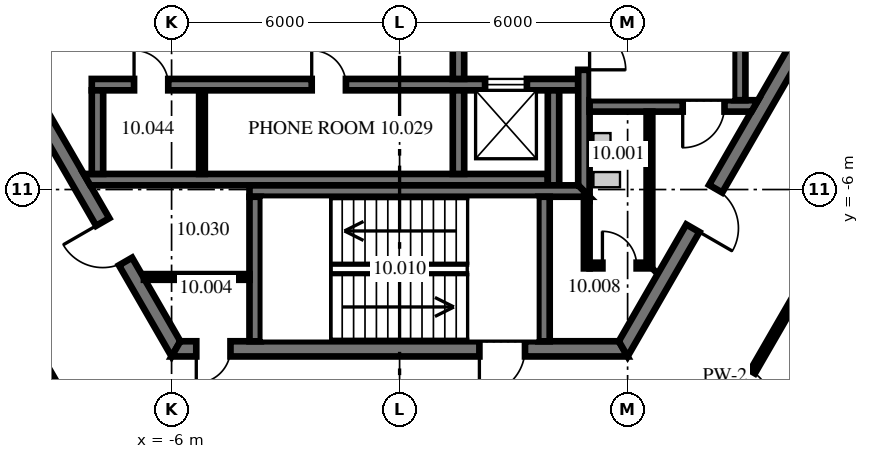
"""IFC4 building model, lengths in metres.
Left out: names, types, materials, properties, quantities, classifications, styles, units other than length and angle.
Written with IfcOpenShell. Run it as: python <this file> out.ifc"""

import sys

from ifc_helpers import new_model, si_unit, direction, frame, frame_2d, origin, place, context, subcontext, project, spatial, polyline, rectangle, outline, extrude, source, transform, mapped, element, fill, save


model = new_model("IFC4")
c1 = context("Model", 3, precision=1e-05, world=origin(), true_north=direction((0.0, 1.0)))
c2 = subcontext(c1, "Body", "Model", "MODEL_VIEW")
j1 = project(units=[si_unit("LENGTHUNIT", "METRE"), si_unit("PLANEANGLEUNIT", "RADIAN")], contexts=[c1])
p1 = place(None, origin())
s1 = spatial("IfcSite", under=j1, at=p1, CompositionType="ELEMENT")
p2 = place(p1, origin())
s2 = spatial("IfcBuilding", under=s1, at=p2, CompositionType="ELEMENT")
p3 = place(p2, frame((0.0, 0.0, 46.1)))
s3 = spatial("IfcBuildingStorey", under=s2, at=p3, CompositionType="ELEMENT", Elevation=46.1)
m1 = source(origin(), c2, "Body", "SweptSolid", [
    extrude(outline(polyline([(-0.115, -0.2), (11.885, -0.2), (11.654, 0.2), (0.115, 0.2), (-0.115, -0.2)])), origin(), (0.0, 0.0, 1.0), 4.1),
])
p4 = place(p3, frame((-11.769, 0.0, 0.0), z_axis=(0.0, 0.0, 1.0), x_axis=(0.499996592174, -0.866027371285, 0.0)))
e1 = element("IfcWall", 1, at=p4, inside=s3, PredefinedType="SHEAR", context=c2, shape_type="MappedRepresentation", body=[
    mapped(m1, transform((0.0, 0.0, 0.0), scale=1.0)),
])
p5 = place(p4, frame((1.405, 0.0, 0.0)))
e2 = element("IfcOpeningElement", 2, at=p5, cuts=e1, PredefinedType="OPENING", context=c2, shape_type="SweptSolid", body=[
    extrude(rectangle(XDim=1.8, YDim=2.1, at=frame_2d((0.9, 1.05))), frame((0.0, 0.21, 0.0), z_axis=(0.0, -1.0, 0.0), x_axis=(1.0, 0.0, 0.0)), (0.0, 0.0, 1.0), 0.42),
])
p6 = place(p4, frame((7.915, 0.0, 0.0)))
e3 = element("IfcOpeningElement", 3, at=p6, cuts=e1, PredefinedType="OPENING", context=c2, shape_type="SweptSolid", body=[
    extrude(rectangle(XDim=1.2, YDim=2.1, at=frame_2d((0.6, 1.05))), frame((0.0, 0.21, 0.0), z_axis=(0.0, -1.0, 0.0), x_axis=(1.0, 0.0, 0.0)), (0.0, 0.0, 1.0), 0.42),
])
p7 = place(p3, frame((-5.885, -10.192, 0.0), z_axis=(0.0, 0.0, 1.0), x_axis=(1.0, 0.0, 0.0)))
e4 = element("IfcWall", 4, at=p7, inside=s3, PredefinedType="SHEAR", context=c2, shape_type="MappedRepresentation", body=[
    mapped(m1, transform((0.0, 0.0, 0.0), scale=1.0)),
])
p8 = place(p7, frame((7.985, 0.0, 0.0)))
e5 = element("IfcOpeningElement", 5, at=p8, cuts=e4, PredefinedType="OPENING", context=c2, shape_type="SweptSolid", body=[
    extrude(rectangle(XDim=1.2, YDim=2.1, at=frame_2d((0.6, 1.05))), frame((0.0, 0.21, 0.0), z_axis=(0.0, -1.0, 0.0), x_axis=(1.0, 0.0, 0.0)), (0.0, 0.0, 1.0), 0.42),
])
p9 = place(p7, frame((0.534, 0.0, 0.0)))
e6 = element("IfcOpeningElement", 6, at=p9, cuts=e4, PredefinedType="OPENING", context=c2, shape_type="SweptSolid", body=[
    extrude(rectangle(XDim=0.9, YDim=2.1, at=frame_2d((0.45, 1.05))), frame((0.0, 0.21, 0.0), z_axis=(0.0, -1.0, 0.0), x_axis=(1.0, 0.0, 0.0)), (0.0, 0.0, 1.0), 0.42),
])
p10 = place(p3, frame((5.885, -10.192, 0.0), z_axis=(0.0, 0.0, 1.0), x_axis=(0.499996592174, 0.866027371285, 0.0)))
e7 = element("IfcWall", 7, at=p10, inside=s3, PredefinedType="SHEAR", context=c2, shape_type="MappedRepresentation", body=[
    mapped(m1, transform((0.0, 0.0, 0.0), scale=1.0)),
])
p11 = place(p10, frame((3.665, 0.0, 0.0)))
e8 = element("IfcOpeningElement", 8, at=p11, cuts=e7, PredefinedType="OPENING", context=c2, shape_type="SweptSolid", body=[
    extrude(rectangle(XDim=1.2, YDim=2.1, at=frame_2d((0.6, 1.05))), frame((0.0, 0.21, 0.0), z_axis=(0.0, -1.0, 0.0), x_axis=(1.0, 0.0, 0.0)), (0.0, 0.0, 1.0), 0.42),
])
m2 = source(origin(), c2, "Body", "SweptSolid", [
    extrude(rectangle(XDim=12.8, YDim=0.3, at=frame_2d((6.4, 0.0))), origin(), (0.0, 0.0, 1.0), 4.1),
])
p12 = place(p3, frame((-8.1, -3.24, 0.0), z_axis=(0.0, 0.0, 1.0), x_axis=(1.0, 0.0, 0.0)))
e9 = element("IfcWall", 9, at=p12, inside=s3, PredefinedType="SHEAR", context=c2, shape_type="MappedRepresentation", body=[
    mapped(m2, transform((0.0, 0.0, 0.0), scale=1.0)),
])
p13 = place(p12, frame((1.113, 0.0, 0.0)))
e10 = element("IfcOpeningElement", 10, at=p13, cuts=e9, PredefinedType="OPENING", context=c2, shape_type="SweptSolid", body=[
    extrude(rectangle(XDim=0.9, YDim=2.1, at=frame_2d((0.45, 1.05))), frame((0.0, 0.16, 0.0), z_axis=(0.0, -1.0, 0.0), x_axis=(1.0, 0.0, 0.0)), (0.0, 0.0, 1.0), 0.32),
])
p14 = place(p12, frame((5.788, 0.0, 0.0)))
e11 = element("IfcOpeningElement", 11, at=p14, cuts=e9, PredefinedType="OPENING", context=c2, shape_type="SweptSolid", body=[
    extrude(rectangle(XDim=0.9, YDim=2.1, at=frame_2d((0.45, 1.05))), frame((0.0, 0.16, 0.0), z_axis=(0.0, -1.0, 0.0), x_axis=(1.0, 0.0, 0.0)), (0.0, 0.0, 1.0), 0.32),
])
p15 = place(p12, frame((10.35, 0.0, 0.0)))
e12 = element("IfcOpeningElement", 12, at=p15, cuts=e9, PredefinedType="OPENING", context=c2, shape_type="SweptSolid", body=[
    extrude(rectangle(XDim=1.1, YDim=2.1, at=frame_2d((0.55, 1.05))), frame((0.0, 0.16, 0.0), z_axis=(0.0, -1.0, 0.0), x_axis=(1.0, 0.0, 0.0)), (0.0, 0.0, 1.0), 0.32),
])
m3 = source(origin(), c2, "Body", "SweptSolid", [
    extrude(outline(polyline([(12.0, -0.15), (-0.04, -0.15), (-0.213, 0.15), (12.0, 0.15), (12.0, -0.15)])), origin(), (0.0, 0.0, 1.0), 4.1),
])
p16 = place(p3, frame((-8.1, -5.74, 0.0), z_axis=(0.0, 0.0, 1.0), x_axis=(1.0, 0.0, 0.0)))
e13 = element("IfcWall", 13, at=p16, inside=s3, PredefinedType="SHEAR", context=c2, shape_type="MappedRepresentation", body=[
    mapped(m3, transform((0.0, 0.0, 0.0), scale=1.0)),
])
m4 = source(origin(), c2, "Body", "SweptSolid", [
    extrude(rectangle(XDim=2.2, YDim=0.3, at=frame_2d((1.1, 0.0))), origin(), (0.0, 0.0, 1.0), 4.1),
])
for number, where, z_axis, x_axis in (
    (14, (-7.95, -5.59, 0.0), (0.0, 0.0, 1.0), (0.0, 1.0, 0.0)),
    (15, (1.55, -5.59, 0.0), (0.0, 0.0, 1.0), (0.0, 1.0, 0.0)),
):
    element("IfcWall", number, at=place(p3, frame(where, z_axis=z_axis, x_axis=x_axis)), inside=s3, PredefinedType="SHEAR", context=c2, shape_type="MappedRepresentation", body=[
        mapped(m4, transform((0.0, 0.0, 0.0), scale=1.0)),
    ])
m5 = source(origin(), c2, "Body", "SweptSolid", [
    extrude(rectangle(XDim=2.5, YDim=0.3, at=frame_2d((1.25, 0.0))), origin(), (0.0, 0.0, 1.0), 4.1),
])
p17 = place(p3, frame((4.05, -5.89, 0.0), z_axis=(0.0, 0.0, 1.0), x_axis=(0.0, 1.0, 0.0)))
e16 = element("IfcWall", 16, at=p17, inside=s3, PredefinedType="SHEAR", context=c2, shape_type="MappedRepresentation", body=[
    mapped(m5, transform((0.0, 0.0, 0.0), scale=1.0)),
])
m6 = source(origin(), c2, "Body", "SweptSolid", [
    extrude(rectangle(XDim=3.0, YDim=0.3, at=frame_2d((1.5, 0.0))), origin(), (0.0, 0.0, 1.0), 4.1),
])
p18 = place(p3, frame((1.55, -3.09, 0.0), z_axis=(0.0, 0.0, 1.0), x_axis=(0.0, 1.0, 0.0)))
e17 = element("IfcWall", 17, at=p18, inside=s3, PredefinedType="SHEAR", context=c2, shape_type="MappedRepresentation", body=[
    mapped(m6, transform((0.0, 0.0, 0.0), scale=1.0)),
])
p19 = place(p18, frame((0.9, 0.0, 0.0)))
e18 = element("IfcOpeningElement", 18, at=p19, cuts=e17, PredefinedType="OPENING", context=c2, shape_type="SweptSolid", body=[
    extrude(rectangle(XDim=1.2, YDim=2.1, at=frame_2d((0.6, 1.05))), frame((0.0, 0.16, 0.0), z_axis=(0.0, -1.0, 0.0), x_axis=(1.0, 0.0, 0.0)), (0.0, 0.0, 1.0), 0.32),
])
m7 = source(origin(), c2, "Body", "SweptSolid", [
    extrude(outline(polyline([(-0.15, -0.15), (9.99, -0.15), (9.99, 0.15), (0.15, 0.15), (-0.15, -0.15)])), origin(), (0.0, 0.0, 1.0), 4.1),
])
p20 = place(p3, frame((4.85, -6.04, 0.0), z_axis=(0.0, 0.0, 1.0), x_axis=(0.0, 1.0, 0.0)))
e19 = element("IfcWall", 19, at=p20, inside=s3, PredefinedType="SHEAR", context=c2, shape_type="MappedRepresentation", body=[
    mapped(m7, transform((0.0, 0.0, 0.0), scale=1.0)),
])
p21 = place(p20, frame((3.19, 0.0, 0.0)))
e20 = element("IfcOpeningElement", 20, at=p21, cuts=e19, PredefinedType="OPENING", context=c2, shape_type="SweptSolid", body=[
    extrude(rectangle(XDim=1.1, YDim=2.1, at=frame_2d((0.55, 1.05))), frame((0.0, 0.16, 0.0), z_axis=(0.0, -1.0, 0.0), x_axis=(1.0, 0.0, 0.0)), (0.0, 0.0, 1.0), 0.32),
])
m8 = source(origin(), c2, "Body", "SweptSolid", [
    extrude(outline(polyline([(0.0, -0.15), (0.0, 0.15), (4.433, 0.15), (4.26, -0.15), (0.0, -0.15)])), origin(), (0.0, 0.0, 1.0), 4.1),
])
p22 = place(p3, frame((5.0, -3.8, 0.0), z_axis=(0.0, 0.0, 1.0), x_axis=(1.0, 0.0, 0.0)))
e21 = element("IfcWall", 21, at=p22, inside=s3, PredefinedType="SHEAR", context=c2, shape_type="MappedRepresentation", body=[
    mapped(m8, transform((0.0, 0.0, 0.0), scale=1.0)),
])
p23 = place(p22, frame((2.45, 0.0, 0.0)))
e22 = element("IfcOpeningElement", 22, at=p23, cuts=e21, PredefinedType="OPENING", context=c2, shape_type="SweptSolid", body=[
    extrude(rectangle(XDim=1.1, YDim=2.1, at=frame_2d((0.55, 1.05))), frame((0.0, 0.16, 0.0), z_axis=(0.0, -1.0, 0.0), x_axis=(1.0, 0.0, 0.0)), (0.0, 0.0, 1.0), 0.32),
])
m9 = source(origin(), c2, "Body", "SweptSolid", [
    extrude(rectangle(XDim=7.3, YDim=0.3, at=frame_2d((3.65, 0.0))), origin(), (0.0, 0.0, 1.0), 4.1),
])
p24 = place(p3, frame((8.95, -3.65, 0.0), z_axis=(0.0, 0.0, 1.0), x_axis=(0.0, 1.0, 0.0)))
e23 = element("IfcWall", 23, at=p24, inside=s3, PredefinedType="SHEAR", context=c2, shape_type="MappedRepresentation", body=[
    mapped(m9, transform((0.0, 0.0, 0.0), scale=1.0)),
])
m10 = source(origin(), c2, "Body", "SweptSolid", [
    extrude(outline(polyline([(0.0, -0.15), (8.95, -0.15), (8.65, 0.15), (0.0, 0.15), (0.0, -0.15)])), origin(), (0.0, 0.0, 1.0), 4.1),
])
p25 = place(p3, frame((-3.95, -6.04, 0.0), z_axis=(0.0, 0.0, 1.0), x_axis=(1.0, 0.0, 0.0)))
e24 = element("IfcWall", 24, at=p25, inside=s3, PredefinedType="SHEAR", context=c2, shape_type="MappedRepresentation", body=[
    mapped(m10, transform((0.0, 0.0, 0.0), scale=1.0)),
])
m11 = source(origin(), c2, "Body", "SweptSolid", [
    extrude(outline(polyline([(3.8, -0.15), (-0.004, -0.15), (-0.004, 0.15), (3.8, 0.15), (3.8, -0.15)])), origin(), (0.0, 0.0, 1.0), 4.1),
])
for number, where, z_axis, x_axis in (
    (25, (-3.8, -9.99, 0.0), (0.0, 0.0, 1.0), (0.0, 1.0, 0.0)),
    (26, (3.8, -9.99, 0.0), (0.0, 0.0, 1.0), (0.0, 1.0, 0.0)),
):
    element("IfcWall", number, at=place(p3, frame(where, z_axis=z_axis, x_axis=x_axis)), inside=s3, PredefinedType="SHEAR", context=c2, shape_type="MappedRepresentation", body=[
        mapped(m11, transform((0.0, 0.0, 0.0), scale=1.0)),
    ])
m12 = source(origin(), c2, "Body", "SweptSolid", [
    extrude(rectangle(XDim=2.2, YDim=0.15, at=frame_2d((1.1, 0.0))), origin(), (0.0, 0.0, 1.0), 4.1),
])
p26 = place(p3, frame((-5.2, -5.59, 0.0), z_axis=(0.0, 0.0, 1.0), x_axis=(0.0, 1.0, 0.0)))
e27 = element("IfcWall", 27, at=p26, inside=s3, PredefinedType="PARTITIONING", context=c2, shape_type="MappedRepresentation", body=[
    mapped(m12, transform((0.0, 0.0, 0.0), scale=1.0)),
])
m13 = source(origin(), c2, "Body", "SweptSolid", [
    extrude(rectangle(XDim=2.777, YDim=0.15, at=frame_2d((1.389, 0.0))), origin(), (0.0, 0.0, 1.0), 4.1),
])
p27 = place(p3, frame((-6.727, -8.3, 0.0), z_axis=(0.0, 0.0, 1.0), x_axis=(1.0, 0.0, 0.0)))
e28 = element("IfcWall", 28, at=p27, inside=s3, PredefinedType="PARTITIONING", context=c2, shape_type="MappedRepresentation", body=[
    mapped(m13, transform((0.0, 0.0, 0.0), scale=1.0)),
])
m14 = source(origin(), c2, "Body", "SweptSolid", [
    extrude(outline(polyline([(0.0, -0.075), (1.65, -0.075), (1.5, 0.075), (0.0, 0.075), (0.0, -0.075)])), origin(), (0.0, 0.0, 1.0), 4.1),
])
p28 = place(p3, frame((5.0, -8.0, 0.0), z_axis=(0.0, 0.0, 1.0), x_axis=(1.0, 0.0, 0.0)))
e29 = element("IfcWall", 29, at=p28, inside=s3, PredefinedType="PARTITIONING", context=c2, shape_type="MappedRepresentation", body=[
    mapped(m14, transform((0.0, 0.0, 0.0), scale=1.0)),
])
p29 = place(p28, frame((0.337, 0.0, 0.0)))
e30 = element("IfcOpeningElement", 30, at=p29, cuts=e29, PredefinedType="OPENING", context=c2, shape_type="SweptSolid", body=[
    extrude(rectangle(XDim=0.9, YDim=2.1, at=frame_2d((0.45, 1.05))), frame((0.0, 0.085, 0.0), z_axis=(0.0, -1.0, 0.0), x_axis=(1.0, 0.0, 0.0)), (0.0, 0.0, 1.0), 0.17),
])
m15 = source(origin(), c2, "Body", "SweptSolid", [
    extrude(outline(polyline([(-0.075, -0.075), (4.05, -0.075), (4.05, 0.075), (0.075, 0.075), (-0.075, -0.075)])), origin(), (0.0, 0.0, 1.0), 4.1),
])
p30 = place(p3, frame((6.575, -8.0, 0.0), z_axis=(0.0, 0.0, 1.0), x_axis=(0.0, 1.0, 0.0)))
e31 = element("IfcWall", 31, at=p30, inside=s3, PredefinedType="PARTITIONING", context=c2, shape_type="MappedRepresentation", body=[
    mapped(m15, transform((0.0, 0.0, 0.0), scale=1.0)),
])
m16 = source(origin(), c2, "Body", "SweptSolid", [
    extrude(rectangle(XDim=1.885, YDim=0.15, at=frame_2d((0.942, 0.0))), origin(), (0.0, 0.0, 1.0), 4.1),
])
p31 = place(p3, frame((4.925, -8.075, 0.0), z_axis=(0.0, 0.0, 1.0), x_axis=(0.0, 1.0, 0.0)))
e32 = element("IfcWall", 32, at=p31, inside=s3, PredefinedType="PARTITIONING", context=c2, shape_type="MappedRepresentation", body=[
    mapped(m16, transform((0.0, 0.0, 0.0), scale=1.0)),
])
p32 = place(p3, frame((-12.827, -4.668, 0.0), z_axis=(0.0, 0.0, 1.0), x_axis=(0.500014404596, -0.866017087127, 0.0)))
e33 = element("IfcWall", 33, at=p32, inside=s3, PredefinedType="PARTITIONING", context=c2, shape_type="SweptSolid", body=[
    extrude(rectangle(XDim=10.062, YDim=0.2, at=frame_2d((5.031, 0.0))), origin(), (0.0, 0.0, 1.0), 4.1),
])
p33 = place(p32, frame((4.493, 0.0, 0.0)))
e34 = element("IfcOpeningElement", 34, at=p33, cuts=e33, PredefinedType="OPENING", context=c2, shape_type="SweptSolid", body=[
    extrude(rectangle(XDim=0.9, YDim=2.1, at=frame_2d((0.45, 1.05))), frame((0.0, 0.11, 0.0), z_axis=(0.0, -1.0, 0.0), x_axis=(1.0, 0.0, 0.0)), (0.0, 0.0, 1.0), 0.22),
])
p34 = place(p3, frame((7.776, -13.416, 0.0), z_axis=(0.0, 0.0, 1.0), x_axis=(0.50002671436, 0.866009979692, 0.0)))
e35 = element("IfcWall", 35, at=p34, inside=s3, PredefinedType="PARTITIONING", context=c2, shape_type="SweptSolid", body=[
    extrude(rectangle(XDim=5.14, YDim=0.15, at=frame_2d((2.57, 0.0))), origin(), (0.0, 0.0, 1.0), 4.1),
])
p35 = place(p34, frame((2.12, 0.0, 0.0)))
e36 = element("IfcOpeningElement", 36, at=p35, cuts=e35, PredefinedType="OPENING", context=c2, shape_type="SweptSolid", body=[
    extrude(rectangle(XDim=0.9, YDim=2.1, at=frame_2d((0.45, 1.05))), frame((0.0, 0.085, 0.0), z_axis=(0.0, -1.0, 0.0), x_axis=(1.0, 0.0, 0.0)), (0.0, 0.0, 1.0), 0.17),
])
p36 = place(p8, frame((1.2, 0.0, 0.0), z_axis=(0.0, 0.0, 1.0), x_axis=(-1.0, 0.0, 0.0)))
e37 = element("IfcDoor", 37, at=p36, inside=s3, OperationType="SINGLE_SWING_RIGHT", PredefinedType="DOOR", context=c2, shape_type="SweptSolid", body=[
    extrude(rectangle(XDim=1.2, YDim=2.1, at=frame_2d((0.6, 1.05))), frame((0.0, 0.025, 0.0), z_axis=(0.0, -1.0, 0.0), x_axis=(1.0, 0.0, 0.0)), (0.0, 0.0, 1.0), 0.05),
])
fill(e5, e37)
p37 = place(p11, frame((1.2, 0.0, 0.0), z_axis=(0.0, 0.0, 1.0), x_axis=(-1.0, 0.0, 0.0)))
e38 = element("IfcDoor", 38, at=p37, inside=s3, OperationType="SINGLE_SWING_RIGHT", PredefinedType="DOOR", context=c2, shape_type="SweptSolid", body=[
    extrude(rectangle(XDim=1.2, YDim=2.1, at=frame_2d((0.6, 1.05))), frame((0.0, 0.025, 0.0), z_axis=(0.0, -1.0, 0.0), x_axis=(1.0, 0.0, 0.0)), (0.0, 0.0, 1.0), 0.05),
])
fill(e8, e38)
p38 = place(p21, frame((1.1, 0.0, 0.0), z_axis=(0.0, 0.0, 1.0), x_axis=(-1.0, 0.0, 0.0)))
e39 = element("IfcDoor", 39, at=p38, inside=s3, OperationType="SINGLE_SWING_RIGHT", PredefinedType="DOOR", context=c2, shape_type="SweptSolid", body=[
    extrude(rectangle(XDim=1.1, YDim=2.1, at=frame_2d((0.55, 1.05))), frame((0.0, 0.025, 0.0), z_axis=(0.0, -1.0, 0.0), x_axis=(1.0, 0.0, 0.0)), (0.0, 0.0, 1.0), 0.05),
])
fill(e20, e39)
p39 = place(p23, frame((1.1, 0.0, 0.0), z_axis=(0.0, 0.0, 1.0), x_axis=(-1.0, 0.0, 0.0)))
e40 = element("IfcDoor", 40, at=p39, inside=s3, OperationType="SINGLE_SWING_RIGHT", PredefinedType="DOOR", context=c2, shape_type="SweptSolid", body=[
    extrude(rectangle(XDim=1.1, YDim=2.1, at=frame_2d((0.55, 1.05))), frame((0.0, 0.025, 0.0), z_axis=(0.0, -1.0, 0.0), x_axis=(1.0, 0.0, 0.0)), (0.0, 0.0, 1.0), 0.05),
])
fill(e22, e40)
p40 = place(p13, origin())
e41 = element("IfcDoor", 41, at=p40, inside=s3, OperationType="SINGLE_SWING_LEFT", PredefinedType="DOOR", context=c2, shape_type="SweptSolid", body=[
    extrude(rectangle(XDim=0.9, YDim=2.1, at=frame_2d((0.45, 1.05))), frame((0.0, 0.025, 0.0), z_axis=(0.0, -1.0, 0.0), x_axis=(1.0, 0.0, 0.0)), (0.0, 0.0, 1.0), 0.05),
])
fill(e10, e41)
p41 = place(p14, origin())
e42 = element("IfcDoor", 42, at=p41, inside=s3, OperationType="SINGLE_SWING_LEFT", PredefinedType="DOOR", context=c2, shape_type="SweptSolid", body=[
    extrude(rectangle(XDim=0.9, YDim=2.1, at=frame_2d((0.45, 1.05))), frame((0.0, 0.025, 0.0), z_axis=(0.0, -1.0, 0.0), x_axis=(1.0, 0.0, 0.0)), (0.0, 0.0, 1.0), 0.05),
])
fill(e11, e42)
p42 = place(p6, frame((1.2, 0.0, 0.0), z_axis=(0.0, 0.0, 1.0), x_axis=(-1.0, 0.0, 0.0)))
e43 = element("IfcDoor", 43, at=p42, inside=s3, OperationType="SINGLE_SWING_RIGHT", PredefinedType="DOOR", context=c2, shape_type="SweptSolid", body=[
    extrude(rectangle(XDim=1.2, YDim=2.1, at=frame_2d((0.6, 1.05))), frame((0.0, 0.025, 0.0), z_axis=(0.0, -1.0, 0.0), x_axis=(1.0, 0.0, 0.0)), (0.0, 0.0, 1.0), 0.05),
])
fill(e3, e43)
p43 = place(p9, frame((0.9, 0.0, 0.0), z_axis=(0.0, 0.0, 1.0), x_axis=(-1.0, 0.0, 0.0)))
e44 = element("IfcDoor", 44, at=p43, inside=s3, OperationType="SINGLE_SWING_RIGHT", PredefinedType="DOOR", context=c2, shape_type="SweptSolid", body=[
    extrude(rectangle(XDim=0.9, YDim=2.1, at=frame_2d((0.45, 1.05))), frame((0.0, 0.025, 0.0), z_axis=(0.0, -1.0, 0.0), x_axis=(1.0, 0.0, 0.0)), (0.0, 0.0, 1.0), 0.05),
])
fill(e6, e44)
p44 = place(p29, origin())
e45 = element("IfcDoor", 45, at=p44, inside=s3, OperationType="SINGLE_SWING_LEFT", PredefinedType="DOOR", context=c2, shape_type="SweptSolid", body=[
    extrude(rectangle(XDim=0.9, YDim=2.1, at=frame_2d((0.45, 1.05))), frame((0.0, 0.025, 0.0), z_axis=(0.0, -1.0, 0.0), x_axis=(1.0, 0.0, 0.0)), (0.0, 0.0, 1.0), 0.05),
])
fill(e30, e45)
p45 = place(p15, origin())
e46 = element("IfcDoor", 46, at=p45, inside=s3, OperationType="DOUBLE_DOOR_SLIDING", PredefinedType="DOOR", context=c2, shape_type="SweptSolid", body=[
    extrude(rectangle(XDim=1.1, YDim=2.1, at=frame_2d((0.55, 1.05))), frame((0.0, 0.025, 0.0), z_axis=(0.0, -1.0, 0.0), x_axis=(1.0, 0.0, 0.0)), (0.0, 0.0, 1.0), 0.05),
])
fill(e12, e46)
p46 = place(p35, origin())
e47 = element("IfcDoor", 47, at=p46, inside=s3, OperationType="SINGLE_SWING_RIGHT", PredefinedType="DOOR", context=c2, shape_type="SweptSolid", body=[
    extrude(rectangle(XDim=0.9, YDim=2.1, at=frame_2d((0.45, 1.05))), frame((0.0, 0.025, 0.0), z_axis=(0.0, -1.0, 0.0), x_axis=(1.0, 0.0, 0.0)), (0.0, 0.0, 1.0), 0.05),
])
fill(e36, e47)
save(model, sys.argv[1])
